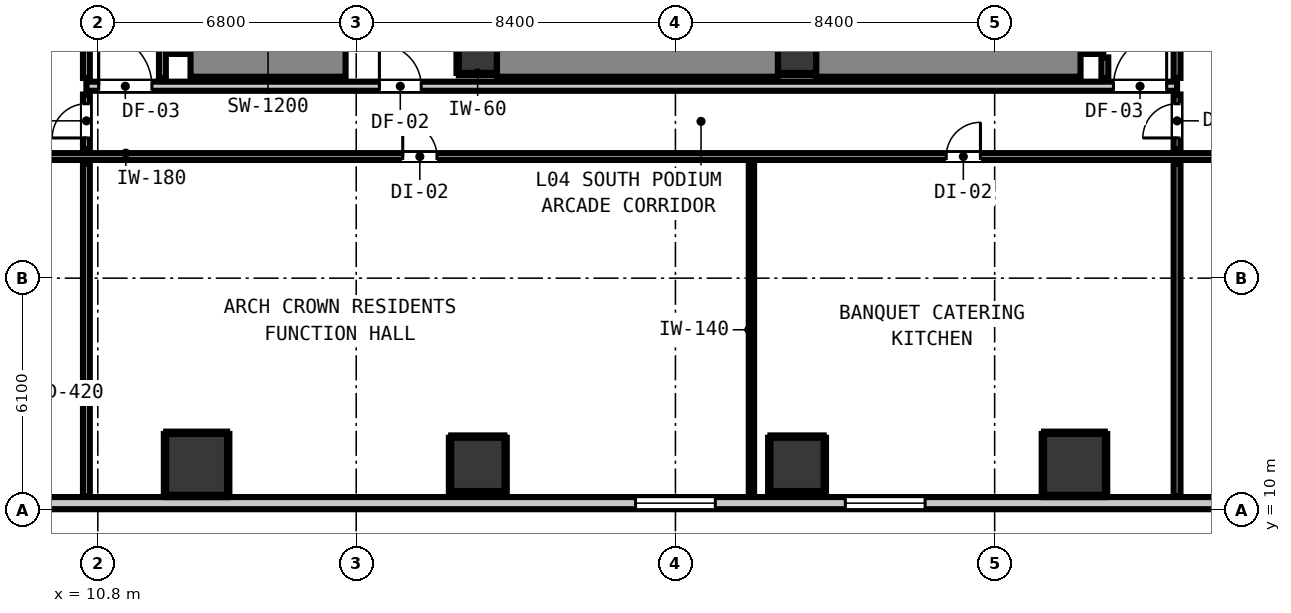
"""IFC4 building model, lengths in metres.
Left out: names, types, materials, properties, quantities, classifications, styles, units other than length and angle.
Written with IfcOpenShell. Run it as: python <this file> out.ifc"""

import sys

from ifc_helpers import new_model, si_unit, direction, frame, frame_2d, origin, origin_2d, place, context, subcontext, project, spatial, rectangle, extrude, element, fill, save


model = new_model("IFC4")
c1 = context("Model", 3, precision=1e-05, world=origin(), true_north=direction((0.0, 1.0)))
c2 = subcontext(c1, "Body", "Model", "MODEL_VIEW")
j1 = project(units=[si_unit("LENGTHUNIT", "METRE"), si_unit("PLANEANGLEUNIT", "RADIAN")], contexts=[c1])
p1 = place(None, origin())
s1 = spatial("IfcSite", under=j1, at=p1, CompositionType="ELEMENT")
p2 = place(p1, origin())
s2 = spatial("IfcBuilding", under=s1, at=p2, CompositionType="ELEMENT")
p3 = place(p2, frame((0.0, 0.0, 17.8)))
s3 = spatial("IfcBuildingStorey", under=s2, at=p3, CompositionType="ELEMENT", Elevation=17.8)
for number, where, z_axis, x_axis in (
    (1, (20.8, 22.0, 0.0), (0.0, 0.0, 1.0), (1.0, 0.0, 0.0)),
    (2, (29.2, 22.0, 0.0), (0.0, 0.0, 1.0), (1.0, 0.0, 0.0)),
):
    element("IfcColumn", number, at=place(p3, frame(where, z_axis=z_axis, x_axis=x_axis)), inside=s3, PredefinedType="COLUMN", context=c2, shape_type="SweptSolid", body=[
        extrude(rectangle(XDim=1.0, YDim=1.0, at=origin_2d()), origin(), (0.0, 0.0, 1.0), 4.2),
    ])
p4 = place(p3, frame((13.24, 22.0, 0.0), z_axis=(0.0, 0.0, 1.0), x_axis=(0.0, 1.0, 0.0)))
e3 = element("IfcWall", 3, at=p4, inside=s3, PredefinedType="SHEAR", context=c2, shape_type="SweptSolid", body=[
    extrude(rectangle(XDim=8.195, YDim=1.2, at=frame_2d((4.098, 0.0))), origin(), (0.0, 0.0, 1.0), 4.2),
])
p5 = place(p3, frame((13.24, 22.0, 0.0), z_axis=(0.0, 0.0, 1.0), x_axis=(1.0, 0.0, 0.0)))
e4 = element("IfcWall", 4, at=p5, inside=s3, PredefinedType="SHEAR", context=c2, shape_type="SweptSolid", body=[
    extrude(rectangle(XDim=4.08, YDim=1.2, at=frame_2d((2.04, 0.0))), origin(), (0.0, 0.0, 1.0), 4.2),
])
p6 = place(p3, frame((36.66, 22.0, 0.0), z_axis=(0.0, 0.0, 1.0), x_axis=(0.0, 1.0, 0.0)))
e5 = element("IfcWall", 5, at=p6, inside=s3, PredefinedType="SHEAR", context=c2, shape_type="SweptSolid", body=[
    extrude(rectangle(XDim=8.195, YDim=1.2, at=frame_2d((4.098, 0.0))), origin(), (0.0, 0.0, 1.0), 4.2),
])
p7 = place(p3, frame((29.705, 22.0, 0.0), z_axis=(0.0, 0.0, 1.0), x_axis=(1.0, 0.0, 0.0)))
e6 = element("IfcWall", 6, at=p7, inside=s3, PredefinedType="SHEAR", context=c2, shape_type="SweptSolid", body=[
    extrude(rectangle(XDim=6.955, YDim=1.2, at=frame_2d((3.478, 0.0))), origin(), (0.0, 0.0, 1.0), 4.2),
])
p8 = place(p3, frame((21.305, 22.0, 0.0), z_axis=(0.0, 0.0, 1.0), x_axis=(1.0, 0.0, 0.0)))
e7 = element("IfcWall", 7, at=p8, inside=s3, PredefinedType="SHEAR", context=c2, shape_type="SweptSolid", body=[
    extrude(rectangle(XDim=7.39, YDim=1.2, at=frame_2d((3.695, 0.0))), origin(), (0.0, 0.0, 1.0), 4.2),
])
for number, where, z_axis, x_axis in (
    (8, (13.4, 11.2, 0.0), (0.0, 0.0, 1.0), (1.0, 0.0, 0.0)),
    (9, (36.5, 11.2, 0.0), (0.0, 0.0, 1.0), (1.0, 0.0, 0.0)),
):
    element("IfcColumn", number, at=place(p3, frame(where, z_axis=z_axis, x_axis=x_axis)), inside=s3, PredefinedType="COLUMN", context=c2, shape_type="SweptSolid", body=[
        extrude(rectangle(XDim=1.6, YDim=1.6, at=origin_2d()), origin(), (0.0, 0.0, 1.0), 3.78),
    ])
for number, where, z_axis, x_axis in (
    (10, (20.8, 11.2, -0.42), (0.0, 0.0, 1.0), (1.0, 0.0, 0.0)),
    (11, (29.2, 11.2, -0.42), (0.0, 0.0, 1.0), (1.0, 0.0, 0.0)),
):
    element("IfcColumn", number, at=place(p3, frame(where, z_axis=z_axis, x_axis=x_axis)), inside=s3, PredefinedType="COLUMN", context=c2, shape_type="SweptSolid", body=[
        extrude(rectangle(XDim=1.4, YDim=1.4, at=origin_2d()), origin(), (0.0, 0.0, 1.0), 4.2),
    ])
p9 = place(p3, frame((45.32, 10.18, 0.0), z_axis=(0.0, 0.0, 1.0), x_axis=(-1.0, 0.0, 0.0)))
e12 = element("IfcWall", 12, at=p9, inside=s3, PredefinedType="STANDARD", context=c2, shape_type="SweptSolid", body=[
    extrude(rectangle(XDim=38.64, YDim=0.32, at=frame_2d((19.32, 0.0))), origin(), (0.0, 0.0, 1.0), 3.78),
])
p10 = place(p9, frame((1.71, 0.0, 0.9)))
e13 = element("IfcOpeningElement", 13, at=p10, cuts=e12, PredefinedType="OPENING", context=c2, shape_type="SweptSolid", body=[
    extrude(rectangle(XDim=2.1, YDim=1.9, at=frame_2d((1.05, 0.95))), frame((0.0, 0.17, 0.0), z_axis=(0.0, -1.0, 0.0), x_axis=(1.0, 0.0, 0.0)), (0.0, 0.0, 1.0), 0.34),
])
p11 = place(p9, frame((12.75, 0.0, 0.9)))
e14 = element("IfcOpeningElement", 14, at=p11, cuts=e12, PredefinedType="OPENING", context=c2, shape_type="SweptSolid", body=[
    extrude(rectangle(XDim=2.1, YDim=1.9, at=frame_2d((1.05, 0.95))), frame((0.0, 0.17, 0.0), z_axis=(0.0, -1.0, 0.0), x_axis=(1.0, 0.0, 0.0)), (0.0, 0.0, 1.0), 0.34),
])
p12 = place(p9, frame((18.27, 0.0, 0.9)))
e15 = element("IfcOpeningElement", 15, at=p12, cuts=e12, PredefinedType="OPENING", context=c2, shape_type="SweptSolid", body=[
    extrude(rectangle(XDim=2.1, YDim=1.9, at=frame_2d((1.05, 0.95))), frame((0.0, 0.17, 0.0), z_axis=(0.0, -1.0, 0.0), x_axis=(1.0, 0.0, 0.0)), (0.0, 0.0, 1.0), 0.34),
])
p13 = place(p3, frame((10.5, 21.15, 0.0), z_axis=(0.0, 0.0, 1.0), x_axis=(1.0, 0.0, 0.0)))
e16 = element("IfcWall", 16, at=p13, inside=s3, PredefinedType="PARTITIONING", context=c2, shape_type="SweptSolid", body=[
    extrude(rectangle(XDim=28.7, YDim=0.24, at=frame_2d((14.35, 0.0))), origin(), (0.0, 0.0, 1.0), 3.78),
])
p14 = place(p13, frame((7.71, 0.0, 0.0)))
e17 = element("IfcOpeningElement", 17, at=p14, cuts=e16, PredefinedType="OPENING", context=c2, shape_type="SweptSolid", body=[
    extrude(rectangle(XDim=1.1, YDim=2.15, at=frame_2d((0.55, 1.075))), frame((0.0, 0.13, 0.0), z_axis=(0.0, -1.0, 0.0), x_axis=(1.0, 0.0, 0.0)), (0.0, 0.0, 1.0), 0.26),
])
p15 = place(p13, frame((0.324, 0.0, 0.0)))
e18 = element("IfcOpeningElement", 18, at=p15, cuts=e16, PredefinedType="OPENING", context=c2, shape_type="SweptSolid", body=[
    extrude(rectangle(XDim=1.4, YDim=2.15, at=frame_2d((0.7, 1.075))), frame((0.0, 0.13, 0.0), z_axis=(0.0, -1.0, 0.0), x_axis=(1.0, 0.0, 0.0)), (0.0, 0.0, 1.0), 0.26),
])
p16 = place(p13, frame((27.026, 0.0, 0.0)))
e19 = element("IfcOpeningElement", 19, at=p16, cuts=e16, PredefinedType="OPENING", context=c2, shape_type="SweptSolid", body=[
    extrude(rectangle(XDim=1.4, YDim=2.15, at=frame_2d((0.7, 1.075))), frame((0.0, 0.13, 0.0), z_axis=(0.0, -1.0, 0.0), x_axis=(1.0, 0.0, 0.0)), (0.0, 0.0, 1.0), 0.26),
])
p17 = place(p3, frame((4.352, 19.3, 0.0), z_axis=(0.0, 0.0, 1.0), x_axis=(1.0, 0.0, 0.0)))
e20 = element("IfcWall", 20, at=p17, inside=s3, PredefinedType="PARTITIONING", context=c2, shape_type="SweptSolid", body=[
    extrude(rectangle(XDim=43.296, YDim=0.18, at=frame_2d((21.648, 0.0))), origin(), (0.0, 0.0, 1.0), 3.78),
])
p18 = place(p17, frame((14.472, 0.0, 0.0)))
e21 = element("IfcOpeningElement", 21, at=p18, cuts=e20, PredefinedType="OPENING", context=c2, shape_type="SweptSolid", body=[
    extrude(rectangle(XDim=0.9, YDim=2.1, at=frame_2d((0.45, 1.05))), frame((0.0, 0.1, 0.0), z_axis=(0.0, -1.0, 0.0), x_axis=(1.0, 0.0, 0.0)), (0.0, 0.0, 1.0), 0.2),
])
p19 = place(p17, frame((28.774, 0.0, 0.0)))
e22 = element("IfcOpeningElement", 22, at=p19, cuts=e20, PredefinedType="OPENING", context=c2, shape_type="SweptSolid", body=[
    extrude(rectangle(XDim=0.9, YDim=2.1, at=frame_2d((0.45, 1.05))), frame((0.0, 0.1, 0.0), z_axis=(0.0, -1.0, 0.0), x_axis=(1.0, 0.0, 0.0)), (0.0, 0.0, 1.0), 0.2),
])
p20 = place(p3, frame((10.5, 10.352, 0.0), z_axis=(0.0, 0.0, 1.0), x_axis=(0.0, 1.0, 0.0)))
e23 = element("IfcWall", 23, at=p20, inside=s3, PredefinedType="PARTITIONING", context=c2, shape_type="SweptSolid", body=[
    extrude(rectangle(XDim=8.76, YDim=0.18, at=frame_2d((4.38, 0.0))), origin(), (0.0, 0.0, 1.0), 3.78),
])
p21 = place(p3, frame((10.5, 19.488, 0.0), z_axis=(0.0, 0.0, 1.0), x_axis=(0.0, 1.0, 0.0)))
e24 = element("IfcWall", 24, at=p21, inside=s3, PredefinedType="PARTITIONING", context=c2, shape_type="SweptSolid", body=[
    extrude(rectangle(XDim=1.444, YDim=0.18, at=frame_2d((0.722, 0.0))), origin(), (0.0, 0.0, 1.0), 3.78),
])
p22 = place(p21, frame((0.301, 0.0, 0.0)))
e25 = element("IfcOpeningElement", 25, at=p22, cuts=e24, PredefinedType="OPENING", context=c2, shape_type="SweptSolid", body=[
    extrude(rectangle(XDim=0.9, YDim=2.1, at=frame_2d((0.45, 1.05))), frame((0.0, 0.1, 0.0), z_axis=(0.0, -1.0, 0.0), x_axis=(1.0, 0.0, 0.0)), (0.0, 0.0, 1.0), 0.2),
])
for number, where, z_axis, x_axis in (
    (26, (10.5, 21.368, 0.0), (0.0, 0.0, 1.0), (0.0, 1.0, 0.0)),
    (27, (12.5, 21.368, 0.0), (0.0, 0.0, 1.0), (0.0, 1.0, 0.0)),
):
    element("IfcWall", number, at=place(p3, frame(where, z_axis=z_axis, x_axis=x_axis)), inside=s3, PredefinedType="PARTITIONING", context=c2, shape_type="SweptSolid", body=[
        extrude(rectangle(XDim=18.694, YDim=0.18, at=frame_2d((9.347, 0.0))), origin(), (0.0, 0.0, 1.0), 3.78),
    ])
p23 = place(p3, frame((37.3, 21.368, 0.0), z_axis=(0.0, 0.0, 1.0), x_axis=(0.0, 1.0, 0.0)))
e28 = element("IfcWall", 28, at=p23, inside=s3, PredefinedType="PARTITIONING", context=c2, shape_type="SweptSolid", body=[
    extrude(rectangle(XDim=0.54, YDim=0.18, at=frame_2d((0.27, 0.0))), origin(), (0.0, 0.0, 1.0), 3.78),
])
p24 = place(p3, frame((39.2, 10.352, 0.0), z_axis=(0.0, 0.0, 1.0), x_axis=(0.0, 1.0, 0.0)))
e29 = element("IfcWall", 29, at=p24, inside=s3, PredefinedType="PARTITIONING", context=c2, shape_type="SweptSolid", body=[
    extrude(rectangle(XDim=8.76, YDim=0.18, at=frame_2d((4.38, 0.0))), origin(), (0.0, 0.0, 1.0), 3.78),
])
p25 = place(p3, frame((39.2, 19.488, 0.0), z_axis=(0.0, 0.0, 1.0), x_axis=(0.0, 1.0, 0.0)))
e30 = element("IfcWall", 30, at=p25, inside=s3, PredefinedType="PARTITIONING", context=c2, shape_type="SweptSolid", body=[
    extrude(rectangle(XDim=1.444, YDim=0.18, at=frame_2d((0.722, 0.0))), origin(), (0.0, 0.0, 1.0), 3.78),
])
p26 = place(p25, frame((0.301, 0.0, 0.0)))
e31 = element("IfcOpeningElement", 31, at=p26, cuts=e30, PredefinedType="OPENING", context=c2, shape_type="SweptSolid", body=[
    extrude(rectangle(XDim=0.9, YDim=2.1, at=frame_2d((0.45, 1.05))), frame((0.0, 0.1, 0.0), z_axis=(0.0, -1.0, 0.0), x_axis=(1.0, 0.0, 0.0)), (0.0, 0.0, 1.0), 0.2),
])
p27 = place(p3, frame((39.2, 21.368, 0.0), z_axis=(0.0, 0.0, 1.0), x_axis=(0.0, 1.0, 0.0)))
e32 = element("IfcWall", 32, at=p27, inside=s3, PredefinedType="PARTITIONING", context=c2, shape_type="SweptSolid", body=[
    extrude(rectangle(XDim=18.694, YDim=0.18, at=frame_2d((9.347, 0.0))), origin(), (0.0, 0.0, 1.0), 3.78),
])
p28 = place(p3, frame((28.0, 10.352, 0.0), z_axis=(0.0, 0.0, 1.0), x_axis=(0.0, 1.0, 0.0)))
e33 = element("IfcWall", 33, at=p28, inside=s3, PredefinedType="PARTITIONING", context=c2, shape_type="SweptSolid", body=[
    extrude(rectangle(XDim=8.78, YDim=0.14, at=frame_2d((4.39, 0.0))), origin(), (0.0, 0.0, 1.0), 3.78),
])
p29 = place(p3, frame((20.3, 21.468, 0.0), z_axis=(0.0, 0.0, 1.0), x_axis=(1.0, 0.0, 0.0)))
e34 = element("IfcWall", 34, at=p29, inside=s3, PredefinedType="PARTITIONING", context=c2, shape_type="SweptSolid", body=[
    extrude(rectangle(XDim=0.99, YDim=0.06, at=frame_2d((0.495, 0.0))), origin(), (0.0, 0.0, 1.0), 1.45),
])
p30 = place(p3, frame((20.268, 21.5, 0.0), z_axis=(0.0, 0.0, 1.0), x_axis=(0.0, 1.0, 0.0)))
e35 = element("IfcWall", 35, at=p30, inside=s3, PredefinedType="PARTITIONING", context=c2, shape_type="SweptSolid", body=[
    extrude(rectangle(XDim=1.0, YDim=0.06, at=frame_2d((0.5, 0.0))), origin(), (0.0, 0.0, 1.0), 1.45),
])
p31 = place(p3, frame((28.71, 21.468, 0.0), z_axis=(0.0, 0.0, 1.0), x_axis=(1.0, 0.0, 0.0)))
e36 = element("IfcWall", 36, at=p31, inside=s3, PredefinedType="PARTITIONING", context=c2, shape_type="SweptSolid", body=[
    extrude(rectangle(XDim=0.98, YDim=0.06, at=frame_2d((0.49, 0.0))), origin(), (0.0, 0.0, 1.0), 1.45),
])
for number, where, z_axis, x_axis in (
    (37, (12.6, 10.368, 0.0), (0.0, 0.0, 1.0), (1.0, 0.0, 0.0)),
    (38, (12.6, 12.032, 0.0), (0.0, 0.0, 1.0), (1.0, 0.0, 0.0)),
):
    element("IfcWall", number, at=place(p3, frame(where, z_axis=z_axis, x_axis=x_axis)), inside=s3, PredefinedType="PARTITIONING", context=c2, shape_type="SweptSolid", body=[
        extrude(rectangle(XDim=1.6, YDim=0.06, at=frame_2d((0.8, 0.0))), origin(), (0.0, 0.0, 1.0), 1.45),
    ])
for number, where, z_axis, x_axis in (
    (39, (12.568, 10.4, 0.0), (0.0, 0.0, 1.0), (0.0, 1.0, 0.0)),
    (40, (14.232, 10.4, 0.0), (0.0, 0.0, 1.0), (0.0, 1.0, 0.0)),
    (41, (35.7, 10.368, 0.0), (0.0, 0.0, 1.0), (1.0, 0.0, 0.0)),
    (42, (35.7, 12.032, 0.0), (0.0, 0.0, 1.0), (1.0, 0.0, 0.0)),
    (43, (35.668, 10.4, 0.0), (0.0, 0.0, 1.0), (0.0, 1.0, 0.0)),
    (44, (37.332, 10.4, 0.0), (0.0, 0.0, 1.0), (0.0, 1.0, 0.0)),
):
    element("IfcWall", number, at=place(p3, frame(where, z_axis=z_axis, x_axis=x_axis)), inside=s3, PredefinedType="PARTITIONING", context=c2, shape_type="SweptSolid", body=[
        extrude(rectangle(XDim=1.6, YDim=0.06, at=frame_2d((0.8, 0.0))), origin(), (0.0, 0.0, 1.0), 1.45),
    ])
for number, where, z_axis, x_axis in (
    (45, (20.1, 10.468, 0.0), (0.0, 0.0, 1.0), (1.0, 0.0, 0.0)),
    (46, (20.1, 11.932, 0.0), (0.0, 0.0, 1.0), (1.0, 0.0, 0.0)),
    (47, (20.068, 10.5, 0.0), (0.0, 0.0, 1.0), (0.0, 1.0, 0.0)),
    (48, (21.532, 10.5, 0.0), (0.0, 0.0, 1.0), (0.0, 1.0, 0.0)),
    (49, (28.5, 10.468, 0.0), (0.0, 0.0, 1.0), (1.0, 0.0, 0.0)),
    (50, (28.5, 11.932, 0.0), (0.0, 0.0, 1.0), (1.0, 0.0, 0.0)),
    (51, (28.468, 10.5, 0.0), (0.0, 0.0, 1.0), (0.0, 1.0, 0.0)),
    (52, (29.932, 10.5, 0.0), (0.0, 0.0, 1.0), (0.0, 1.0, 0.0)),
):
    element("IfcWall", number, at=place(p3, frame(where, z_axis=z_axis, x_axis=x_axis)), inside=s3, PredefinedType="PARTITIONING", context=c2, shape_type="SweptSolid", body=[
        extrude(rectangle(XDim=1.4, YDim=0.06, at=frame_2d((0.7, 0.0))), origin(), (0.0, 0.0, 1.0), 1.45),
    ])
p32 = place(p11, origin())
e53 = element("IfcWindow", 53, at=p32, inside=s3, PartitioningType="SINGLE_PANEL", PredefinedType="WINDOW", context=c2, shape_type="SweptSolid", body=[
    extrude(rectangle(XDim=2.1, YDim=1.9, at=frame_2d((1.05, 0.95))), frame((0.0, 0.03, 0.0), z_axis=(0.0, -1.0, 0.0), x_axis=(1.0, 0.0, 0.0)), (0.0, 0.0, 1.0), 0.06),
])
fill(e14, e53)
p33 = place(p12, origin())
e54 = element("IfcWindow", 54, at=p33, inside=s3, PartitioningType="SINGLE_PANEL", PredefinedType="WINDOW", context=c2, shape_type="SweptSolid", body=[
    extrude(rectangle(XDim=2.1, YDim=1.9, at=frame_2d((1.05, 0.95))), frame((0.0, 0.03, 0.0), z_axis=(0.0, -1.0, 0.0), x_axis=(1.0, 0.0, 0.0)), (0.0, 0.0, 1.0), 0.06),
])
fill(e15, e54)
p34 = place(p14, origin())
e55 = element("IfcDoor", 55, at=p34, inside=s3, OperationType="SINGLE_SWING_LEFT", PredefinedType="DOOR", context=c2, shape_type="SweptSolid", body=[
    extrude(rectangle(XDim=1.1, YDim=2.15, at=frame_2d((0.55, 1.075))), frame((0.0, 0.025, 0.0), z_axis=(0.0, -1.0, 0.0), x_axis=(1.0, 0.0, 0.0)), (0.0, 0.0, 1.0), 0.05),
])
fill(e17, e55)
p35 = place(p15, origin())
e56 = element("IfcDoor", 56, at=p35, inside=s3, OperationType="SINGLE_SWING_LEFT", PredefinedType="DOOR", context=c2, shape_type="SweptSolid", body=[
    extrude(rectangle(XDim=1.4, YDim=2.15, at=frame_2d((0.7, 1.075))), frame((0.0, 0.025, 0.0), z_axis=(0.0, -1.0, 0.0), x_axis=(1.0, 0.0, 0.0)), (0.0, 0.0, 1.0), 0.05),
])
fill(e18, e56)
p36 = place(p16, origin())
e57 = element("IfcDoor", 57, at=p36, inside=s3, OperationType="SINGLE_SWING_RIGHT", PredefinedType="DOOR", context=c2, shape_type="SweptSolid", body=[
    extrude(rectangle(XDim=1.4, YDim=2.15, at=frame_2d((0.7, 1.075))), frame((0.0, 0.025, 0.0), z_axis=(0.0, -1.0, 0.0), x_axis=(1.0, 0.0, 0.0)), (0.0, 0.0, 1.0), 0.05),
])
fill(e19, e57)
p37 = place(p18, origin())
e58 = element("IfcDoor", 58, at=p37, inside=s3, OperationType="SINGLE_SWING_LEFT", PredefinedType="DOOR", context=c2, shape_type="SweptSolid", body=[
    extrude(rectangle(XDim=0.9, YDim=2.1, at=frame_2d((0.45, 1.05))), frame((0.0, 0.025, 0.0), z_axis=(0.0, -1.0, 0.0), x_axis=(1.0, 0.0, 0.0)), (0.0, 0.0, 1.0), 0.05),
])
fill(e21, e58)
p38 = place(p19, origin())
e59 = element("IfcDoor", 59, at=p38, inside=s3, OperationType="SINGLE_SWING_RIGHT", PredefinedType="DOOR", context=c2, shape_type="SweptSolid", body=[
    extrude(rectangle(XDim=0.9, YDim=2.1, at=frame_2d((0.45, 1.05))), frame((0.0, 0.025, 0.0), z_axis=(0.0, -1.0, 0.0), x_axis=(1.0, 0.0, 0.0)), (0.0, 0.0, 1.0), 0.05),
])
fill(e22, e59)
p39 = place(p22, origin())
e60 = element("IfcDoor", 60, at=p39, inside=s3, OperationType="SINGLE_SWING_LEFT", PredefinedType="DOOR", context=c2, shape_type="SweptSolid", body=[
    extrude(rectangle(XDim=0.9, YDim=2.1, at=frame_2d((0.45, 1.05))), frame((0.0, 0.025, 0.0), z_axis=(0.0, -1.0, 0.0), x_axis=(1.0, 0.0, 0.0)), (0.0, 0.0, 1.0), 0.05),
])
fill(e25, e60)
p40 = place(p26, origin())
e61 = element("IfcDoor", 61, at=p40, inside=s3, OperationType="SINGLE_SWING_LEFT", PredefinedType="DOOR", context=c2, shape_type="SweptSolid", body=[
    extrude(rectangle(XDim=0.9, YDim=2.1, at=frame_2d((0.45, 1.05))), frame((0.0, 0.025, 0.0), z_axis=(0.0, -1.0, 0.0), x_axis=(1.0, 0.0, 0.0)), (0.0, 0.0, 1.0), 0.05),
])
fill(e31, e61)
save(model, sys.argv[1])
